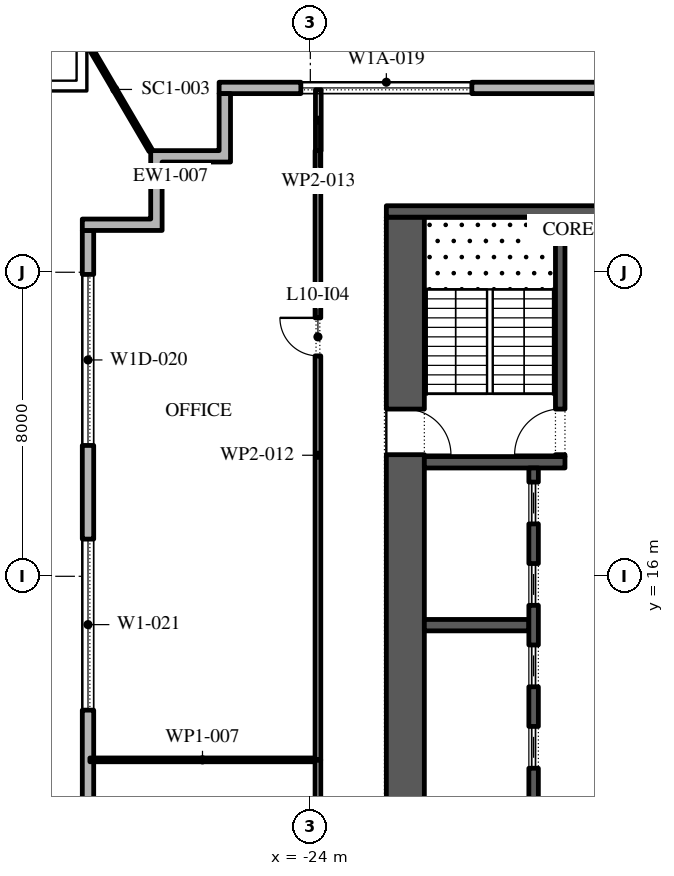
"""IFC4 building model, lengths in metres.
Left out: names, types, materials, properties, quantities, classifications, styles, units other than length and angle.
Written with IfcOpenShell. Run it as: python <this file> out.ifc"""

import sys

from ifc_helpers import new_model, si_unit, direction, frame, frame_2d, origin, place, context, subcontext, project, spatial, polyline, rectangle, outline, extrude, element, fill, save


model = new_model("IFC4")
c1 = context("Model", 3, precision=1e-05, world=origin(), true_north=direction((0.0, 1.0)))
c2 = subcontext(c1, "Body", "Model", "MODEL_VIEW")
j1 = project(units=[si_unit("LENGTHUNIT", "METRE"), si_unit("PLANEANGLEUNIT", "RADIAN")], contexts=[c1])
p1 = place(None, origin())
s1 = spatial("IfcSite", under=j1, at=p1, CompositionType="ELEMENT")
p2 = place(p1, origin())
s2 = spatial("IfcBuilding", under=s1, at=p2, CompositionType="ELEMENT")
p3 = place(p2, frame((0.0, 0.0, 52.2)))
s3 = spatial("IfcBuildingStorey", under=s2, at=p3, CompositionType="ELEMENT", Elevation=52.2)
p4 = place(p3, frame((26.1, 28.85, 0.0), z_axis=(0.0, 0.0, 1.0), x_axis=(-1.0, 0.0, 0.0)))
e1 = element("IfcWall", 1, at=p4, inside=s3, PredefinedType="STANDARD", context=c2, shape_type="SweptSolid", body=[
    extrude(rectangle(XDim=52.5, YDim=0.3, at=frame_2d((26.25, 0.0))), origin(), (0.0, 0.0, 1.0), 4.0),
])
p5 = place(p4, frame((2.0, 0.0, 0.45)))
e2 = element("IfcOpeningElement", 2, at=p5, cuts=e1, PredefinedType="OPENING", context=c2, shape_type="SweptSolid", body=[
    extrude(rectangle(XDim=4.5, YDim=3.0, at=frame_2d((2.25, 1.5))), frame((0.0, 0.16, 0.0), z_axis=(0.0, -1.0, 0.0), x_axis=(1.0, 0.0, 0.0)), (0.0, 0.0, 1.0), 0.32),
])
p6 = place(p4, frame((10.65, 0.0, 0.45)))
e3 = element("IfcOpeningElement", 3, at=p6, cuts=e1, PredefinedType="OPENING", context=c2, shape_type="SweptSolid", body=[
    extrude(rectangle(XDim=4.5, YDim=3.0, at=frame_2d((2.25, 1.5))), frame((0.0, 0.16, 0.0), z_axis=(0.0, -1.0, 0.0), x_axis=(1.0, 0.0, 0.0)), (0.0, 0.0, 1.0), 0.32),
])
p7 = place(p4, frame((20.5, 0.0, 0.0)))
e4 = element("IfcOpeningElement", 4, at=p7, cuts=e1, PredefinedType="OPENING", context=c2, shape_type="SweptSolid", body=[
    extrude(rectangle(XDim=2.4, YDim=3.5, at=frame_2d((1.2, 1.75))), frame((0.0, 0.16, 0.0), z_axis=(0.0, -1.0, 0.0), x_axis=(1.0, 0.0, 0.0)), (0.0, 0.0, 1.0), 0.32),
])
p8 = place(p4, frame((28.25, 0.0, 0.45)))
e5 = element("IfcOpeningElement", 5, at=p8, cuts=e1, PredefinedType="OPENING", context=c2, shape_type="SweptSolid", body=[
    extrude(rectangle(XDim=4.5, YDim=3.0, at=frame_2d((2.25, 1.5))), frame((0.0, 0.16, 0.0), z_axis=(0.0, -1.0, 0.0), x_axis=(1.0, 0.0, 0.0)), (0.0, 0.0, 1.0), 0.32),
])
p9 = place(p4, frame((37.05, 0.0, 0.45)))
e6 = element("IfcOpeningElement", 6, at=p9, cuts=e1, PredefinedType="OPENING", context=c2, shape_type="SweptSolid", body=[
    extrude(rectangle(XDim=4.5, YDim=3.0, at=frame_2d((2.25, 1.5))), frame((0.0, 0.16, 0.0), z_axis=(0.0, -1.0, 0.0), x_axis=(1.0, 0.0, 0.0)), (0.0, 0.0, 1.0), 0.32),
])
p10 = place(p4, frame((45.85, 0.0, 0.45)))
e7 = element("IfcOpeningElement", 7, at=p10, cuts=e1, PredefinedType="OPENING", context=c2, shape_type="SweptSolid", body=[
    extrude(rectangle(XDim=4.5, YDim=3.0, at=frame_2d((2.25, 1.5))), frame((0.0, 0.16, 0.0), z_axis=(0.0, -1.0, 0.0), x_axis=(1.0, 0.0, 0.0)), (0.0, 0.0, 1.0), 0.32),
])
p11 = place(p3, frame((-29.85, 25.1, 0.0), z_axis=(0.0, 0.0, 1.0), x_axis=(0.0, -1.0, 0.0)))
e8 = element("IfcWall", 8, at=p11, inside=s3, PredefinedType="STANDARD", context=c2, shape_type="SweptSolid", body=[
    extrude(rectangle(XDim=49.5, YDim=0.3, at=frame_2d((24.75, 0.0))), origin(), (0.0, 0.0, 1.0), 4.0),
])
p12 = place(p11, frame((1.157, 0.0, 0.45)))
e9 = element("IfcOpeningElement", 9, at=p12, cuts=e8, PredefinedType="OPENING", context=c2, shape_type="SweptSolid", body=[
    extrude(rectangle(XDim=4.5, YDim=2.875, at=frame_2d((2.25, 1.438))), frame((0.0, 0.16, 0.0), z_axis=(0.0, -1.0, 0.0), x_axis=(1.0, 0.0, 0.0)), (0.0, 0.0, 1.0), 0.32),
])
p13 = place(p11, frame((8.121, 0.0, 0.45)))
e10 = element("IfcOpeningElement", 10, at=p13, cuts=e8, PredefinedType="OPENING", context=c2, shape_type="SweptSolid", body=[
    extrude(rectangle(XDim=4.5, YDim=3.05, at=frame_2d((2.25, 1.525))), frame((0.0, 0.16, 0.0), z_axis=(0.0, -1.0, 0.0), x_axis=(1.0, 0.0, 0.0)), (0.0, 0.0, 1.0), 0.32),
])
p14 = place(p11, frame((16.286, 0.0, 0.0)))
e11 = element("IfcOpeningElement", 11, at=p14, cuts=e8, PredefinedType="OPENING", context=c2, shape_type="SweptSolid", body=[
    extrude(rectangle(XDim=2.4, YDim=3.325, at=frame_2d((1.2, 1.663))), frame((0.0, 0.16, 0.0), z_axis=(0.0, -1.0, 0.0), x_axis=(1.0, 0.0, 0.0)), (0.0, 0.0, 1.0), 0.32),
])
p15 = place(p11, frame((22.35, 0.0, 0.45)))
e12 = element("IfcOpeningElement", 12, at=p15, cuts=e8, PredefinedType="OPENING", context=c2, shape_type="SweptSolid", body=[
    extrude(rectangle(XDim=4.5, YDim=2.875, at=frame_2d((2.25, 1.438))), frame((0.0, 0.16, 0.0), z_axis=(0.0, -1.0, 0.0), x_axis=(1.0, 0.0, 0.0)), (0.0, 0.0, 1.0), 0.32),
])
p16 = place(p11, frame((29.464, 0.0, 0.45)))
e13 = element("IfcOpeningElement", 13, at=p16, cuts=e8, PredefinedType="OPENING", context=c2, shape_type="SweptSolid", body=[
    extrude(rectangle(XDim=4.5, YDim=2.875, at=frame_2d((2.25, 1.438))), frame((0.0, 0.16, 0.0), z_axis=(0.0, -1.0, 0.0), x_axis=(1.0, 0.0, 0.0)), (0.0, 0.0, 1.0), 0.32),
])
p17 = place(p11, frame((36.579, 0.0, 0.45)))
e14 = element("IfcOpeningElement", 14, at=p17, cuts=e8, PredefinedType="OPENING", context=c2, shape_type="SweptSolid", body=[
    extrude(rectangle(XDim=4.5, YDim=2.825, at=frame_2d((2.25, 1.413))), frame((0.0, 0.16, 0.0), z_axis=(0.0, -1.0, 0.0), x_axis=(1.0, 0.0, 0.0)), (0.0, 0.0, 1.0), 0.32),
])
p18 = place(p11, frame((44.743, 0.0, 0.0)))
e15 = element("IfcOpeningElement", 15, at=p18, cuts=e8, PredefinedType="OPENING", context=c2, shape_type="SweptSolid", body=[
    extrude(rectangle(XDim=2.4, YDim=3.5, at=frame_2d((1.2, 1.75))), frame((0.0, 0.16, 0.0), z_axis=(0.0, -1.0, 0.0), x_axis=(1.0, 0.0, 0.0)), (0.0, 0.0, 1.0), 0.32),
])
p19 = place(p3, origin())
e16 = element("IfcWall", 16, at=p19, inside=s3, PredefinedType="STANDARD", context=c2, shape_type="SweptSolid", body=[
    extrude(outline(polyline([(-28.2, 25.4), (-28.2, 27.2), (-26.4, 27.2), (-26.4, 28.7), (-26.1, 28.7), (-26.1, 26.9), (-27.9, 26.9), (-27.9, 25.1), (-30.0, 25.1), (-30.0, 25.4), (-28.2, 25.4)])), origin(), (0.0, 0.0, 1.0), 4.0),
])
p20 = place(p3, frame((-28.2, 27.2, -0.05), z_axis=(0.0, 0.0, 1.0), x_axis=(-0.50603666658, 0.862511966338, 0.0)))
e17 = element("IfcWall", 17, at=p20, inside=s3, PredefinedType="STANDARD", context=c2, shape_type="SweptSolid", body=[
    extrude(rectangle(XDim=3.733, YDim=0.1, at=frame_2d((1.867, 0.0))), origin(), (0.0, 0.0, 1.0), 4.05),
])
p21 = place(p3, frame((-21.5, -2.45, 0.0), z_axis=(0.0, 0.0, 1.0), x_axis=(0.0, 1.0, 0.0)))
e18 = element("IfcWall", 18, at=p21, inside=s3, PredefinedType="SHEAR", context=c2, shape_type="SweptSolid", body=[
    extrude(rectangle(XDim=27.9, YDim=1.0, at=frame_2d((13.95, 0.0))), origin(), (0.0, 0.0, 1.0), 4.0),
])
p22 = place(p21, frame((5.05, 0.0, 0.0)))
e19 = element("IfcOpeningElement", 19, at=p22, cuts=e18, PredefinedType="OPENING", context=c2, shape_type="SweptSolid", body=[
    extrude(rectangle(XDim=1.2, YDim=2.1, at=frame_2d((0.6, 1.05))), frame((0.0, 0.51, 0.0), z_axis=(0.0, -1.0, 0.0), x_axis=(1.0, 0.0, 0.0)), (0.0, 0.0, 1.0), 1.02),
])
p23 = place(p21, frame((21.65, 0.0, 0.0)))
e20 = element("IfcOpeningElement", 20, at=p23, cuts=e18, PredefinedType="OPENING", context=c2, shape_type="SweptSolid", body=[
    extrude(rectangle(XDim=1.2, YDim=2.1, at=frame_2d((0.6, 1.05))), frame((0.0, 0.51, 0.0), z_axis=(0.0, -1.0, 0.0), x_axis=(1.0, 0.0, 0.0)), (0.0, 0.0, 1.0), 1.02),
])
p24 = place(p3, frame((-22.0, 25.6, 0.0), z_axis=(0.0, 0.0, 1.0), x_axis=(1.0, 0.0, 0.0)))
e21 = element("IfcWall", 21, at=p24, inside=s3, PredefinedType="SHEAR", context=c2, shape_type="SweptSolid", body=[
    extrude(rectangle(XDim=12.0, YDim=0.3, at=frame_2d((6.0, 0.0))), origin(), (0.0, 0.0, 1.0), 4.0),
])
p25 = place(p3, frame((-21.0, 19.0, 0.0), z_axis=(0.0, 0.0, 1.0), x_axis=(1.0, 0.0, 0.0)))
e22 = element("IfcWall", 22, at=p25, inside=s3, PredefinedType="SHEAR", context=c2, shape_type="SweptSolid", body=[
    extrude(rectangle(XDim=3.7, YDim=0.3, at=frame_2d((1.85, 0.0))), origin(), (0.0, 0.0, 1.0), 4.0),
])
p26 = place(p3, frame((-17.425, 19.15, 0.0), z_axis=(0.0, 0.0, 1.0), x_axis=(0.0, 1.0, 0.0)))
e23 = element("IfcWall", 23, at=p26, inside=s3, PredefinedType="SHEAR", context=c2, shape_type="SweptSolid", body=[
    extrude(rectangle(XDim=6.3, YDim=0.25, at=frame_2d((3.15, 0.0))), origin(), (0.0, 0.0, 1.0), 4.0),
])
p27 = place(p26, frame((0.05, 0.0, 0.0)))
e24 = element("IfcOpeningElement", 24, at=p27, cuts=e23, PredefinedType="OPENING", context=c2, shape_type="SweptSolid", body=[
    extrude(rectangle(XDim=1.2, YDim=2.1, at=frame_2d((0.6, 1.05))), frame((0.0, 0.135, 0.0), z_axis=(0.0, -1.0, 0.0), x_axis=(1.0, 0.0, 0.0)), (0.0, 0.0, 1.0), 0.27),
])
p28 = place(p3, frame((-21.0, 14.714, 0.0), z_axis=(0.0, 0.0, 1.0), x_axis=(1.0, 0.0, 0.0)))
e25 = element("IfcWall", 25, at=p28, inside=s3, PredefinedType="SHEAR", context=c2, shape_type="SweptSolid", body=[
    extrude(rectangle(XDim=2.75, YDim=0.3, at=frame_2d((1.375, 0.0))), origin(), (0.0, 0.0, 1.0), 4.0),
])
p29 = place(p3, frame((-18.125, 4.15, 0.0), z_axis=(0.0, 0.0, 1.0), x_axis=(0.0, 1.0, 0.0)))
e26 = element("IfcWall", 26, at=p29, inside=s3, PredefinedType="SHEAR", context=c2, shape_type="SweptSolid", body=[
    extrude(rectangle(XDim=14.7, YDim=0.25, at=frame_2d((7.35, 0.0))), origin(), (0.0, 0.0, 1.0), 4.0),
])
p30 = place(p29, frame((0.371, 0.0, 0.0)))
e27 = element("IfcOpeningElement", 27, at=p30, cuts=e26, PredefinedType="OPENING", context=c2, shape_type="SweptSolid", body=[
    extrude(rectangle(XDim=1.1, YDim=2.1, at=frame_2d((0.55, 1.05))), frame((0.0, 0.135, 0.0), z_axis=(0.0, -1.0, 0.0), x_axis=(1.0, 0.0, 0.0)), (0.0, 0.0, 1.0), 0.27),
])
p31 = place(p29, frame((2.514, 0.0, 0.0)))
e28 = element("IfcOpeningElement", 28, at=p31, cuts=e26, PredefinedType="OPENING", context=c2, shape_type="SweptSolid", body=[
    extrude(rectangle(XDim=1.1, YDim=2.1, at=frame_2d((0.55, 1.05))), frame((0.0, 0.135, 0.0), z_axis=(0.0, -1.0, 0.0), x_axis=(1.0, 0.0, 0.0)), (0.0, 0.0, 1.0), 0.27),
])
p32 = place(p29, frame((4.657, 0.0, 0.0)))
e29 = element("IfcOpeningElement", 29, at=p32, cuts=e26, PredefinedType="OPENING", context=c2, shape_type="SweptSolid", body=[
    extrude(rectangle(XDim=1.1, YDim=2.1, at=frame_2d((0.55, 1.05))), frame((0.0, 0.135, 0.0), z_axis=(0.0, -1.0, 0.0), x_axis=(1.0, 0.0, 0.0)), (0.0, 0.0, 1.0), 0.27),
])
p33 = place(p29, frame((6.8, 0.0, 0.0)))
e30 = element("IfcOpeningElement", 30, at=p33, cuts=e26, PredefinedType="OPENING", context=c2, shape_type="SweptSolid", body=[
    extrude(rectangle(XDim=1.1, YDim=2.1, at=frame_2d((0.55, 1.05))), frame((0.0, 0.135, 0.0), z_axis=(0.0, -1.0, 0.0), x_axis=(1.0, 0.0, 0.0)), (0.0, 0.0, 1.0), 0.27),
])
p34 = place(p29, frame((8.943, 0.0, 0.0)))
e31 = element("IfcOpeningElement", 31, at=p34, cuts=e26, PredefinedType="OPENING", context=c2, shape_type="SweptSolid", body=[
    extrude(rectangle(XDim=1.1, YDim=2.1, at=frame_2d((0.55, 1.05))), frame((0.0, 0.135, 0.0), z_axis=(0.0, -1.0, 0.0), x_axis=(1.0, 0.0, 0.0)), (0.0, 0.0, 1.0), 0.27),
])
p35 = place(p29, frame((11.086, 0.0, 0.0)))
e32 = element("IfcOpeningElement", 32, at=p35, cuts=e26, PredefinedType="OPENING", context=c2, shape_type="SweptSolid", body=[
    extrude(rectangle(XDim=1.1, YDim=2.1, at=frame_2d((0.55, 1.05))), frame((0.0, 0.135, 0.0), z_axis=(0.0, -1.0, 0.0), x_axis=(1.0, 0.0, 0.0)), (0.0, 0.0, 1.0), 0.27),
])
p36 = place(p29, frame((13.229, 0.0, 0.0)))
e33 = element("IfcOpeningElement", 33, at=p36, cuts=e26, PredefinedType="OPENING", context=c2, shape_type="SweptSolid", body=[
    extrude(rectangle(XDim=1.1, YDim=2.1, at=frame_2d((0.55, 1.05))), frame((0.0, 0.135, 0.0), z_axis=(0.0, -1.0, 0.0), x_axis=(1.0, 0.0, 0.0)), (0.0, 0.0, 1.0), 0.27),
])
p37 = place(p3, frame((-23.8, -3.06, 0.0), z_axis=(0.0, 0.0, 1.0), x_axis=(0.0, 1.0, 0.0)))
e34 = element("IfcWall", 34, at=p37, inside=s3, PredefinedType="PARTITIONING", context=c2, shape_type="SweptSolid", body=[
    extrude(rectangle(XDim=14.23, YDim=0.15, at=frame_2d((7.115, 0.0))), origin(), (0.0, 0.0, 1.0), 4.0),
])
p38 = place(p37, frame((8.08, 0.0, 0.0)))
e35 = element("IfcOpeningElement", 35, at=p38, cuts=e34, PredefinedType="OPENING", context=c2, shape_type="SweptSolid", body=[
    extrude(rectangle(XDim=1.0, YDim=2.1, at=frame_2d((0.5, 1.05))), frame((0.0, 0.085, 0.0), z_axis=(0.0, -1.0, 0.0), x_axis=(1.0, 0.0, 0.0)), (0.0, 0.0, 1.0), 0.17),
])
p39 = place(p3, frame((-23.875, 11.17, 0.0), z_axis=(0.0, 0.0, 1.0), x_axis=(-1.0, 0.0, 0.0)))
e36 = element("IfcWall", 36, at=p39, inside=s3, PredefinedType="PARTITIONING", context=c2, shape_type="SweptSolid", body=[
    extrude(rectangle(XDim=5.925, YDim=0.1, at=frame_2d((2.962, 0.0))), origin(), (0.0, 0.0, 1.0), 4.0),
])
p40 = place(p3, frame((-23.8, 11.17, 0.0), z_axis=(0.0, 0.0, 1.0), x_axis=(0.0, 1.0, 0.0)))
e37 = element("IfcWall", 37, at=p40, inside=s3, PredefinedType="PARTITIONING", context=c2, shape_type="SweptSolid", body=[
    extrude(rectangle(XDim=16.03, YDim=0.15, at=frame_2d((8.015, 0.0))), origin(), (0.0, 0.0, 1.0), 4.0),
])
p41 = place(p40, frame((10.63, 0.0, 0.0)))
e38 = element("IfcOpeningElement", 38, at=p41, cuts=e37, PredefinedType="OPENING", context=c2, shape_type="SweptSolid", body=[
    extrude(rectangle(XDim=1.0, YDim=2.1, at=frame_2d((0.5, 1.05))), frame((0.0, 0.085, 0.0), z_axis=(0.0, -1.0, 0.0), x_axis=(1.0, 0.0, 0.0)), (0.0, 0.0, 1.0), 0.17),
])
p42 = place(p3, frame((-23.79, 27.2, 0.0), z_axis=(0.0, 0.0, 1.0), x_axis=(0.0, 1.0, 0.0)))
e39 = element("IfcWall", 39, at=p42, inside=s3, PredefinedType="PARTITIONING", context=c2, shape_type="SweptSolid", body=[
    extrude(rectangle(XDim=1.6, YDim=0.15, at=frame_2d((0.8, 0.0))), origin(), (0.0, 0.0, 1.0), 4.0),
])
p43 = place(p10, origin())
e40 = element("IfcWindow", 40, at=p43, inside=s3, PartitioningType="DOUBLE_PANEL_VERTICAL", PredefinedType="WINDOW", context=c2, shape_type="SweptSolid", body=[
    extrude(rectangle(XDim=4.5, YDim=3.0, at=frame_2d((2.25, 1.5))), frame((0.0, 0.03, 0.0), z_axis=(0.0, -1.0, 0.0), x_axis=(1.0, 0.0, 0.0)), (0.0, 0.0, 1.0), 0.06),
])
fill(e7, e40)
p44 = place(p12, origin())
e41 = element("IfcWindow", 41, at=p44, inside=s3, PartitioningType="DOUBLE_PANEL_VERTICAL", PredefinedType="WINDOW", context=c2, shape_type="SweptSolid", body=[
    extrude(rectangle(XDim=4.5, YDim=2.875, at=frame_2d((2.25, 1.438))), frame((0.0, 0.03, 0.0), z_axis=(0.0, -1.0, 0.0), x_axis=(1.0, 0.0, 0.0)), (0.0, 0.0, 1.0), 0.06),
])
fill(e9, e41)
p45 = place(p13, origin())
e42 = element("IfcWindow", 42, at=p45, inside=s3, PartitioningType="DOUBLE_PANEL_VERTICAL", PredefinedType="WINDOW", context=c2, shape_type="SweptSolid", body=[
    extrude(rectangle(XDim=4.5, YDim=3.05, at=frame_2d((2.25, 1.525))), frame((0.0, 0.03, 0.0), z_axis=(0.0, -1.0, 0.0), x_axis=(1.0, 0.0, 0.0)), (0.0, 0.0, 1.0), 0.06),
])
fill(e10, e42)
p46 = place(p33, origin())
e43 = element("IfcDoor", 43, at=p46, inside=s3, OperationType="SLIDING_TO_LEFT", PredefinedType="DOOR", context=c2, shape_type="SweptSolid", body=[
    extrude(rectangle(XDim=1.1, YDim=2.1, at=frame_2d((0.55, 1.05))), frame((0.0, 0.025, 0.0), z_axis=(0.0, -1.0, 0.0), x_axis=(1.0, 0.0, 0.0)), (0.0, 0.0, 1.0), 0.05),
])
fill(e30, e43)
p47 = place(p34, origin())
e44 = element("IfcDoor", 44, at=p47, inside=s3, OperationType="SLIDING_TO_LEFT", PredefinedType="DOOR", context=c2, shape_type="SweptSolid", body=[
    extrude(rectangle(XDim=1.1, YDim=2.1, at=frame_2d((0.55, 1.05))), frame((0.0, 0.025, 0.0), z_axis=(0.0, -1.0, 0.0), x_axis=(1.0, 0.0, 0.0)), (0.0, 0.0, 1.0), 0.05),
])
fill(e31, e44)
p48 = place(p35, origin())
e45 = element("IfcDoor", 45, at=p48, inside=s3, OperationType="SLIDING_TO_LEFT", PredefinedType="DOOR", context=c2, shape_type="SweptSolid", body=[
    extrude(rectangle(XDim=1.1, YDim=2.1, at=frame_2d((0.55, 1.05))), frame((0.0, 0.025, 0.0), z_axis=(0.0, -1.0, 0.0), x_axis=(1.0, 0.0, 0.0)), (0.0, 0.0, 1.0), 0.05),
])
fill(e32, e45)
p49 = place(p36, origin())
e46 = element("IfcDoor", 46, at=p49, inside=s3, OperationType="SLIDING_TO_LEFT", PredefinedType="DOOR", context=c2, shape_type="SweptSolid", body=[
    extrude(rectangle(XDim=1.1, YDim=2.1, at=frame_2d((0.55, 1.05))), frame((0.0, 0.025, 0.0), z_axis=(0.0, -1.0, 0.0), x_axis=(1.0, 0.0, 0.0)), (0.0, 0.0, 1.0), 0.05),
])
fill(e33, e46)
p50 = place(p27, origin())
e47 = element("IfcDoor", 47, at=p50, inside=s3, OperationType="SINGLE_SWING_RIGHT", PredefinedType="DOOR", context=c2, shape_type="SweptSolid", body=[
    extrude(rectangle(XDim=1.2, YDim=2.1, at=frame_2d((0.6, 1.05))), frame((0.0, 0.025, 0.0), z_axis=(0.0, -1.0, 0.0), x_axis=(1.0, 0.0, 0.0)), (0.0, 0.0, 1.0), 0.05),
])
fill(e24, e47)
p51 = place(p23, frame((1.2, 0.0, 0.0), z_axis=(0.0, 0.0, 1.0), x_axis=(-1.0, 0.0, 0.0)))
e48 = element("IfcDoor", 48, at=p51, inside=s3, OperationType="SINGLE_SWING_LEFT", PredefinedType="DOOR", context=c2, shape_type="SweptSolid", body=[
    extrude(rectangle(XDim=1.2, YDim=2.1, at=frame_2d((0.6, 1.05))), frame((0.0, 0.025, 0.0), z_axis=(0.0, -1.0, 0.0), x_axis=(1.0, 0.0, 0.0)), (0.0, 0.0, 1.0), 0.05),
])
fill(e20, e48)
p52 = place(p41, origin())
e49 = element("IfcDoor", 49, at=p52, inside=s3, OperationType="SINGLE_SWING_LEFT", PredefinedType="DOOR", context=c2, shape_type="SweptSolid", body=[
    extrude(rectangle(XDim=1.0, YDim=2.1, at=frame_2d((0.5, 1.05))), frame((0.0, 0.025, 0.0), z_axis=(0.0, -1.0, 0.0), x_axis=(1.0, 0.0, 0.0)), (0.0, 0.0, 1.0), 0.05),
])
fill(e38, e49)
save(model, sys.argv[1])
